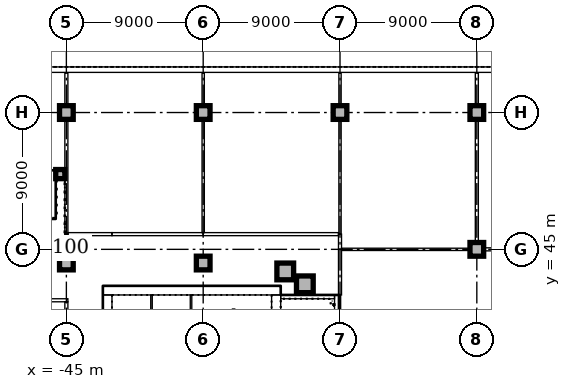
"""IFC4 building model, lengths in metres.
Left out: names, types, materials, properties, quantities, classifications, styles, units other than length and angle.
Written with IfcOpenShell. Run it as: python <this file> out.ifc"""

import sys

from ifc_helpers import new_model, si_unit, direction, frame, frame_2d, origin, origin_2d, place, context, subcontext, project, spatial, rectangle, extrude, element, fill, save


model = new_model("IFC4")
c1 = context("Model", 3, precision=1e-05, world=origin(), true_north=direction((0.0, 1.0)))
c2 = subcontext(c1, "Body", "Model", "MODEL_VIEW")
j1 = project(units=[si_unit("LENGTHUNIT", "METRE"), si_unit("PLANEANGLEUNIT", "RADIAN")], contexts=[c1])
p1 = place(None, origin())
s1 = spatial("IfcSite", under=j1, at=p1, CompositionType="ELEMENT")
p2 = place(p1, origin())
s2 = spatial("IfcBuilding", under=s1, at=p2, CompositionType="ELEMENT")
p3 = place(p2, origin())
s3 = spatial("IfcBuildingStorey", under=s2, at=p3, CompositionType="ELEMENT", Elevation=0.0)
p4 = place(p3, frame((-30.9, 42.3, 0.0), z_axis=(0.0, 0.0, 1.0), x_axis=(-1.0, 0.0, 0.0)))
e1 = element("IfcWall", 1, at=p4, inside=s3, PredefinedType="SOLIDWALL", context=c2, shape_type="SweptSolid", body=[
    extrude(rectangle(XDim=11.7, YDim=0.6, at=frame_2d((5.85, 0.0))), origin(), (0.0, 0.0, 1.0), 6.0),
])
p5 = place(p3, frame((-31.2, 30.5, 0.0), z_axis=(0.0, 0.0, 1.0), x_axis=(0.0, 1.0, 0.0)))
e2 = element("IfcWall", 2, at=p5, inside=s3, PredefinedType="SOLIDWALL", context=c2, shape_type="SweptSolid", body=[
    extrude(rectangle(XDim=11.5, YDim=0.6, at=frame_2d((5.75, 0.0))), origin(), (0.0, 0.0, 1.0), 6.0),
])
p6 = place(p5, frame((0.85, 0.0, 0.0)))
e3 = element("IfcOpeningElement", 3, at=p6, cuts=e2, PredefinedType="OPENING", context=c2, shape_type="SweptSolid", body=[
    extrude(rectangle(XDim=1.8, YDim=2.1, at=frame_2d((0.9, 1.05))), frame((0.0, 0.31, 0.0), z_axis=(0.0, -1.0, 0.0), x_axis=(1.0, 0.0, 0.0)), (0.0, 0.0, 1.0), 0.62),
])
p7 = place(p3, frame((-42.3, 42.0, 0.0), z_axis=(0.0, 0.0, 1.0), x_axis=(0.0, -1.0, 0.0)))
e4 = element("IfcWall", 4, at=p7, inside=s3, PredefinedType="SOLIDWALL", context=c2, shape_type="SweptSolid", body=[
    extrude(rectangle(XDim=11.5, YDim=0.6, at=frame_2d((5.75, 0.0))), origin(), (0.0, 0.0, 1.0), 6.0),
])
p8 = place(p7, frame((8.85, 0.0, 0.0)))
e5 = element("IfcOpeningElement", 5, at=p8, cuts=e4, PredefinedType="OPENING", context=c2, shape_type="SweptSolid", body=[
    extrude(rectangle(XDim=1.8, YDim=2.1, at=frame_2d((0.9, 1.05))), frame((0.0, 0.31, 0.0), z_axis=(0.0, -1.0, 0.0), x_axis=(1.0, 0.0, 0.0)), (0.0, 0.0, 1.0), 0.62),
])
p9 = place(p3, frame((-27.36, 41.875, 0.0), z_axis=(0.0, 0.0, 1.0), x_axis=(-1.0, 0.0, 0.0)))
e6 = element("IfcWall", 6, at=p9, inside=s3, PredefinedType="SOLIDWALL", context=c2, shape_type="SweptSolid", body=[
    extrude(rectangle(XDim=3.54, YDim=0.25, at=frame_2d((1.77, 0.0))), origin(), (0.0, 0.0, 1.0), 6.0),
])
p10 = place(p3, frame((-27.235, 35.35, 0.0), z_axis=(0.0, 0.0, 1.0), x_axis=(0.0, 1.0, 0.0)))
e7 = element("IfcWall", 7, at=p10, inside=s3, PredefinedType="SOLIDWALL", context=c2, shape_type="SweptSolid", body=[
    extrude(rectangle(XDim=6.65, YDim=0.25, at=frame_2d((3.325, 0.0))), origin(), (0.0, 0.0, 1.0), 6.0),
])
for number, where, z_axis, x_axis in (
    (8, (-29.313, 42.7, 0.0), (0.0, 0.0, 1.0), (1.0, 0.0, 0.0)),
    (9, (-30.602, 43.547, 0.0), (0.0, 0.0, 1.0), (1.0, 0.0, 0.0)),
):
    element("IfcColumn", number, at=place(p3, frame(where, z_axis=z_axis, x_axis=x_axis)), inside=s3, PredefinedType="COLUMN", context=c2, shape_type="SweptSolid", body=[
        extrude(rectangle(XDim=1.1, YDim=1.1, at=origin_2d()), origin(), (0.0, 0.0, 1.0), 5.7),
    ])
for number, where, z_axis, x_axis in (
    (10, (-45.0, 44.1, 0.0), (0.0, 0.0, 1.0), (1.0, 0.0, 0.0)),
    (11, (-36.0, 44.1, 0.0), (0.0, 0.0, 1.0), (1.0, 0.0, 0.0)),
    (12, (-45.0, 54.0, 0.0), (0.0, 0.0, 1.0), (1.0, 0.0, 0.0)),
    (13, (-36.0, 54.0, 0.0), (0.0, 0.0, 1.0), (1.0, 0.0, 0.0)),
    (14, (-27.0, 54.0, 0.0), (0.0, 0.0, 1.0), (1.0, 0.0, 0.0)),
    (15, (-18.0, 45.0, 0.0), (0.0, 0.0, 1.0), (1.0, 0.0, 0.0)),
    (16, (-18.0, 54.0, 0.0), (0.0, 0.0, 1.0), (1.0, 0.0, 0.0)),
):
    element("IfcColumn", number, at=place(p3, frame(where, z_axis=z_axis, x_axis=x_axis)), inside=s3, PredefinedType="COLUMN", context=c2, shape_type="SweptSolid", body=[
        extrude(rectangle(XDim=0.9, YDim=0.9, at=origin_2d()), origin(), (0.0, 0.0, 1.0), 5.7),
    ])
p11 = place(p3, frame((3.4, 56.82, 0.0), z_axis=(0.0, 0.0, 1.0), x_axis=(-1.0, 0.0, 0.0)))
e17 = element("IfcWall", 17, at=p11, inside=s3, PredefinedType="STANDARD", context=c2, shape_type="SweptSolid", body=[
    extrude(rectangle(XDim=84.4, YDim=0.36, at=frame_2d((42.2, 0.0))), origin(), (0.0, 0.0, 1.0), 5.7),
])
p12 = place(p11, frame((15.7, 0.0, 0.0)))
e18 = element("IfcOpeningElement", 18, at=p12, cuts=e17, PredefinedType="OPENING", context=c2, shape_type="SweptSolid", body=[
    extrude(rectangle(XDim=2.4, YDim=2.4, at=frame_2d((1.2, 1.2))), frame((0.0, 0.19, 0.0), z_axis=(0.0, -1.0, 0.0), x_axis=(1.0, 0.0, 0.0)), (0.0, 0.0, 1.0), 0.38),
])
p13 = place(p11, frame((76.6, 0.0, 0.0)))
e19 = element("IfcOpeningElement", 19, at=p13, cuts=e17, PredefinedType="OPENING", context=c2, shape_type="SweptSolid", body=[
    extrude(rectangle(XDim=6.6, YDim=4.2, at=frame_2d((3.3, 2.1))), frame((0.0, 0.19, 0.0), z_axis=(0.0, -1.0, 0.0), x_axis=(1.0, 0.0, 0.0)), (0.0, 0.0, 1.0), 0.38),
])
p14 = place(p11, frame((59.65, 0.0, 0.0)))
e20 = element("IfcOpeningElement", 20, at=p14, cuts=e17, PredefinedType="OPENING", context=c2, shape_type="SweptSolid", body=[
    extrude(rectangle(XDim=4.5, YDim=4.2, at=frame_2d((2.25, 2.1))), frame((0.0, 0.19, 0.0), z_axis=(0.0, -1.0, 0.0), x_axis=(1.0, 0.0, 0.0)), (0.0, 0.0, 1.0), 0.38),
])
p15 = place(p11, frame((58.3, 0.0, 0.0)))
e21 = element("IfcOpeningElement", 21, at=p15, cuts=e17, PredefinedType="OPENING", context=c2, shape_type="SweptSolid", body=[
    extrude(rectangle(XDim=1.2, YDim=2.2, at=frame_2d((0.6, 1.1))), frame((0.0, 0.19, 0.0), z_axis=(0.0, -1.0, 0.0), x_axis=(1.0, 0.0, 0.0)), (0.0, 0.0, 1.0), 0.38),
])
p16 = place(p11, frame((70.0, 0.0, 0.0)))
e22 = element("IfcOpeningElement", 22, at=p16, cuts=e17, PredefinedType="OPENING", context=c2, shape_type="SweptSolid", body=[
    extrude(rectangle(XDim=1.8, YDim=2.2, at=frame_2d((0.9, 1.1))), frame((0.0, 0.19, 0.0), z_axis=(0.0, -1.0, 0.0), x_axis=(1.0, 0.0, 0.0)), (0.0, 0.0, 1.0), 0.38),
])
p17 = place(p11, frame((52.0, 0.0, 0.0)))
e23 = element("IfcOpeningElement", 23, at=p17, cuts=e17, PredefinedType="OPENING", context=c2, shape_type="SweptSolid", body=[
    extrude(rectangle(XDim=1.8, YDim=2.2, at=frame_2d((0.9, 1.1))), frame((0.0, 0.19, 0.0), z_axis=(0.0, -1.0, 0.0), x_axis=(1.0, 0.0, 0.0)), (0.0, 0.0, 1.0), 0.38),
])
p18 = place(p11, frame((1.75, 0.0, 0.6)))
e24 = element("IfcOpeningElement", 24, at=p18, cuts=e17, PredefinedType="OPENING", context=c2, shape_type="SweptSolid", body=[
    extrude(rectangle(XDim=3.3, YDim=3.0, at=frame_2d((1.65, 1.5))), frame((0.0, 0.19, 0.0), z_axis=(0.0, -1.0, 0.0), x_axis=(1.0, 0.0, 0.0)), (0.0, 0.0, 1.0), 0.38),
])
p19 = place(p11, frame((6.25, 0.0, 0.6)))
e25 = element("IfcOpeningElement", 25, at=p19, cuts=e17, PredefinedType="OPENING", context=c2, shape_type="SweptSolid", body=[
    extrude(rectangle(XDim=3.3, YDim=3.0, at=frame_2d((1.65, 1.5))), frame((0.0, 0.19, 0.0), z_axis=(0.0, -1.0, 0.0), x_axis=(1.0, 0.0, 0.0)), (0.0, 0.0, 1.0), 0.38),
])
p20 = place(p11, frame((10.75, 0.0, 0.6)))
e26 = element("IfcOpeningElement", 26, at=p20, cuts=e17, PredefinedType="OPENING", context=c2, shape_type="SweptSolid", body=[
    extrude(rectangle(XDim=3.3, YDim=3.0, at=frame_2d((1.65, 1.5))), frame((0.0, 0.19, 0.0), z_axis=(0.0, -1.0, 0.0), x_axis=(1.0, 0.0, 0.0)), (0.0, 0.0, 1.0), 0.38),
])
p21 = place(p11, frame((19.75, 0.0, 0.6)))
e27 = element("IfcOpeningElement", 27, at=p21, cuts=e17, PredefinedType="OPENING", context=c2, shape_type="SweptSolid", body=[
    extrude(rectangle(XDim=3.3, YDim=3.0, at=frame_2d((1.65, 1.5))), frame((0.0, 0.19, 0.0), z_axis=(0.0, -1.0, 0.0), x_axis=(1.0, 0.0, 0.0)), (0.0, 0.0, 1.0), 0.38),
])
p22 = place(p11, frame((24.25, 0.0, 0.6)))
e28 = element("IfcOpeningElement", 28, at=p22, cuts=e17, PredefinedType="OPENING", context=c2, shape_type="SweptSolid", body=[
    extrude(rectangle(XDim=3.3, YDim=3.0, at=frame_2d((1.65, 1.5))), frame((0.0, 0.19, 0.0), z_axis=(0.0, -1.0, 0.0), x_axis=(1.0, 0.0, 0.0)), (0.0, 0.0, 1.0), 0.38),
])
p23 = place(p11, frame((28.75, 0.0, 0.6)))
e29 = element("IfcOpeningElement", 29, at=p23, cuts=e17, PredefinedType="OPENING", context=c2, shape_type="SweptSolid", body=[
    extrude(rectangle(XDim=3.3, YDim=3.0, at=frame_2d((1.65, 1.5))), frame((0.0, 0.19, 0.0), z_axis=(0.0, -1.0, 0.0), x_axis=(1.0, 0.0, 0.0)), (0.0, 0.0, 1.0), 0.38),
])
p24 = place(p11, frame((33.25, 0.0, 0.6)))
e30 = element("IfcOpeningElement", 30, at=p24, cuts=e17, PredefinedType="OPENING", context=c2, shape_type="SweptSolid", body=[
    extrude(rectangle(XDim=3.3, YDim=3.0, at=frame_2d((1.65, 1.5))), frame((0.0, 0.19, 0.0), z_axis=(0.0, -1.0, 0.0), x_axis=(1.0, 0.0, 0.0)), (0.0, 0.0, 1.0), 0.38),
])
p25 = place(p11, frame((37.75, 0.0, 0.6)))
e31 = element("IfcOpeningElement", 31, at=p25, cuts=e17, PredefinedType="OPENING", context=c2, shape_type="SweptSolid", body=[
    extrude(rectangle(XDim=3.3, YDim=3.0, at=frame_2d((1.65, 1.5))), frame((0.0, 0.19, 0.0), z_axis=(0.0, -1.0, 0.0), x_axis=(1.0, 0.0, 0.0)), (0.0, 0.0, 1.0), 0.38),
])
p26 = place(p11, frame((42.25, 0.0, 0.6)))
e32 = element("IfcOpeningElement", 32, at=p26, cuts=e17, PredefinedType="OPENING", context=c2, shape_type="SweptSolid", body=[
    extrude(rectangle(XDim=3.3, YDim=3.0, at=frame_2d((1.65, 1.5))), frame((0.0, 0.19, 0.0), z_axis=(0.0, -1.0, 0.0), x_axis=(1.0, 0.0, 0.0)), (0.0, 0.0, 1.0), 0.38),
])
p27 = place(p11, frame((46.75, 0.0, 0.6)))
e33 = element("IfcOpeningElement", 33, at=p27, cuts=e17, PredefinedType="OPENING", context=c2, shape_type="SweptSolid", body=[
    extrude(rectangle(XDim=3.3, YDim=3.0, at=frame_2d((1.65, 1.5))), frame((0.0, 0.19, 0.0), z_axis=(0.0, -1.0, 0.0), x_axis=(1.0, 0.0, 0.0)), (0.0, 0.0, 1.0), 0.38),
])
for number, where, z_axis, x_axis in (
    (34, (-45.4, 49.95, 0.0), (0.0, 0.0, 1.0), (1.0, 0.0, 0.0)),
    (35, (-45.4, 45.4, 0.0), (0.0, 0.0, 1.0), (1.0, 0.0, 0.0)),
):
    element("IfcColumn", number, at=place(p3, frame(where, z_axis=z_axis, x_axis=x_axis)), inside=s3, PredefinedType="COLUMN", context=c2, shape_type="SweptSolid", body=[
        extrude(rectangle(XDim=0.6, YDim=0.6, at=origin_2d()), origin(), (0.0, 0.0, 1.0), 6.0),
    ])
p28 = place(p3, frame((-45.0, 45.1, 0.0), z_axis=(0.0, 0.0, 1.0), x_axis=(0.0, 1.0, 0.0)))
e36 = element("IfcWall", 36, at=p28, inside=s3, PredefinedType="SOLIDWALL", context=c2, shape_type="SweptSolid", body=[
    extrude(rectangle(XDim=0.9, YDim=0.2, at=frame_2d((0.45, 0.0))), origin(), (0.0, 0.0, 1.0), 5.7),
])
p29 = place(p3, frame((-54.0, 45.0, 0.0), z_axis=(0.0, 0.0, 1.0), x_axis=(1.0, 0.0, 0.0)))
e37 = element("IfcWall", 37, at=p29, inside=s3, PredefinedType="SOLIDWALL", context=c2, shape_type="SweptSolid", body=[
    extrude(rectangle(XDim=9.1, YDim=0.2, at=frame_2d((4.55, 0.0))), origin(), (0.0, 0.0, 1.0), 5.7),
])
p30 = place(p3, frame((-45.0, 46.0, 0.0), z_axis=(0.0, 0.0, 1.0), x_axis=(0.0, 1.0, 0.0)))
e38 = element("IfcWall", 38, at=p30, inside=s3, PredefinedType="SOLIDWALL", context=c2, shape_type="SweptSolid", body=[
    extrude(rectangle(XDim=7.53, YDim=0.2, at=frame_2d((3.765, 0.0))), origin(), (0.0, 0.0, 1.0), 5.7),
])
p31 = place(p3, frame((-45.0, 54.47, 0.0), z_axis=(0.0, 0.0, 1.0), x_axis=(0.0, 1.0, 0.0)))
e39 = element("IfcWall", 39, at=p31, inside=s3, PredefinedType="SOLIDWALL", context=c2, shape_type="SweptSolid", body=[
    extrude(rectangle(XDim=2.13, YDim=0.2, at=frame_2d((1.065, 0.0))), origin(), (0.0, 0.0, 1.0), 5.7),
])
p32 = place(p3, frame((-26.9, 45.0, 0.0), z_axis=(0.0, 0.0, 1.0), x_axis=(1.0, 0.0, 0.0)))
e40 = element("IfcWall", 40, at=p32, inside=s3, PredefinedType="PARTITIONING", context=c2, shape_type="SweptSolid", body=[
    extrude(rectangle(XDim=8.43, YDim=0.15, at=frame_2d((4.215, 0.0))), origin(), (0.0, 0.0, 1.0), 5.7),
])
p33 = place(p3, frame((-18.0, 45.47, 0.0), z_axis=(0.0, 0.0, 1.0), x_axis=(0.0, 1.0, 0.0)))
e41 = element("IfcWall", 41, at=p33, inside=s3, PredefinedType="PARTITIONING", context=c2, shape_type="SweptSolid", body=[
    extrude(rectangle(XDim=8.06, YDim=0.2, at=frame_2d((4.03, 0.0))), origin(), (0.0, 0.0, 1.0), 5.7),
])
p34 = place(p33, frame((5.03, 0.0, 0.0)))
e42 = element("IfcOpeningElement", 42, at=p34, cuts=e41, PredefinedType="OPENING", context=c2, shape_type="SweptSolid", body=[
    extrude(rectangle(XDim=1.0, YDim=2.1, at=frame_2d((0.5, 1.05))), frame((0.0, 0.11, 0.0), z_axis=(0.0, -1.0, 0.0), x_axis=(1.0, 0.0, 0.0)), (0.0, 0.0, 1.0), 0.22),
])
p35 = place(p3, frame((-18.0, 54.47, 0.0), z_axis=(0.0, 0.0, 1.0), x_axis=(0.0, 1.0, 0.0)))
e43 = element("IfcWall", 43, at=p35, inside=s3, PredefinedType="PARTITIONING", context=c2, shape_type="SweptSolid", body=[
    extrude(rectangle(XDim=2.13, YDim=0.2, at=frame_2d((1.065, 0.0))), origin(), (0.0, 0.0, 1.0), 5.7),
])
p36 = place(p3, frame((-27.0, 45.0, 0.0), z_axis=(0.0, 0.0, 1.0), x_axis=(0.0, 1.0, 0.0)))
e44 = element("IfcWall", 44, at=p36, inside=s3, PredefinedType="PARTITIONING", context=c2, shape_type="SweptSolid", body=[
    extrude(rectangle(XDim=1.0, YDim=0.2, at=frame_2d((0.5, 0.0))), origin(), (0.0, 0.0, 1.0), 5.7),
])
p37 = place(p3, frame((-27.0, 46.0, 0.0), z_axis=(0.0, 0.0, 1.0), x_axis=(0.0, 1.0, 0.0)))
e45 = element("IfcWall", 45, at=p37, inside=s3, PredefinedType="PARTITIONING", context=c2, shape_type="SweptSolid", body=[
    extrude(rectangle(XDim=7.53, YDim=0.15, at=frame_2d((3.765, 0.0))), origin(), (0.0, 0.0, 1.0), 5.7),
])
p38 = place(p3, frame((-27.0, 54.47, 0.0), z_axis=(0.0, 0.0, 1.0), x_axis=(0.0, 1.0, 0.0)))
e46 = element("IfcWall", 46, at=p38, inside=s3, PredefinedType="PARTITIONING", context=c2, shape_type="SweptSolid", body=[
    extrude(rectangle(XDim=2.13, YDim=0.15, at=frame_2d((1.065, 0.0))), origin(), (0.0, 0.0, 1.0), 5.7),
])
p39 = place(p3, frame((-17.53, 45.0, 0.0), z_axis=(0.0, 0.0, 1.0), x_axis=(1.0, 0.0, 0.0)))
e47 = element("IfcWall", 47, at=p39, inside=s3, PredefinedType="PARTITIONING", context=c2, shape_type="SweptSolid", body=[
    extrude(rectangle(XDim=4.13, YDim=0.2, at=frame_2d((2.065, 0.0))), origin(), (0.0, 0.0, 1.0), 5.7),
])
p40 = place(p3, frame((-27.0, 42.0, 0.0), z_axis=(0.0, 0.0, 1.0), x_axis=(0.0, 1.0, 0.0)))
e48 = element("IfcWall", 48, at=p40, inside=s3, PredefinedType="PARTITIONING", context=c2, shape_type="SweptSolid", body=[
    extrude(rectangle(XDim=3.0, YDim=0.2, at=frame_2d((1.5, 0.0))), origin(), (0.0, 0.0, 1.0), 5.7),
])
p41 = place(p3, frame((-45.0, 36.42, 0.0), z_axis=(0.0, 0.0, 1.0), x_axis=(0.0, 1.0, 0.0)))
e49 = element("IfcWall", 49, at=p41, inside=s3, PredefinedType="PARTITIONING", context=c2, shape_type="SweptSolid", body=[
    extrude(rectangle(XDim=5.13, YDim=0.2, at=frame_2d((2.565, 0.0))), origin(), (0.0, 0.0, 1.0), 5.7),
])
p42 = place(p3, frame((-52.5, 41.65, 0.0), z_axis=(0.0, 0.0, 1.0), x_axis=(1.0, 0.0, 0.0)))
e50 = element("IfcWall", 50, at=p42, inside=s3, PredefinedType="PARTITIONING", context=c2, shape_type="SweptSolid", body=[
    extrude(rectangle(XDim=7.6, YDim=0.2, at=frame_2d((3.8, 0.0))), origin(), (0.0, 0.0, 1.0), 5.7),
])
p43 = place(p3, frame((-44.9, 46.0, 0.0), z_axis=(0.0, 0.0, 1.0), x_axis=(1.0, 0.0, 0.0)))
e51 = element("IfcWall", 51, at=p43, inside=s3, PredefinedType="PARTITIONING", context=c2, shape_type="SweptSolid", body=[
    extrude(rectangle(XDim=2.9, YDim=0.2, at=frame_2d((1.45, 0.0))), origin(), (0.0, 0.0, 1.0), 5.7),
])
p44 = place(p3, frame((-42.0, 46.0, 0.0), z_axis=(0.0, 0.0, 1.0), x_axis=(1.0, 0.0, 0.0)))
e52 = element("IfcWall", 52, at=p44, inside=s3, PredefinedType="PARTITIONING", context=c2, shape_type="SweptSolid", body=[
    extrude(rectangle(XDim=6.0, YDim=0.2, at=frame_2d((3.0, 0.0))), origin(), (0.0, 0.0, 1.0), 5.7),
])
p45 = place(p44, frame((2.5, 0.0, 0.0)))
e53 = element("IfcOpeningElement", 53, at=p45, cuts=e52, PredefinedType="OPENING", context=c2, shape_type="SweptSolid", body=[
    extrude(rectangle(XDim=1.0, YDim=2.1, at=frame_2d((0.5, 1.05))), frame((0.0, 0.11, 0.0), z_axis=(0.0, -1.0, 0.0), x_axis=(1.0, 0.0, 0.0)), (0.0, 0.0, 1.0), 0.22),
])
p46 = place(p3, frame((-36.0, 46.0, 0.0), z_axis=(0.0, 0.0, 1.0), x_axis=(1.0, 0.0, 0.0)))
e54 = element("IfcWall", 54, at=p46, inside=s3, PredefinedType="PARTITIONING", context=c2, shape_type="SweptSolid", body=[
    extrude(rectangle(XDim=8.9, YDim=0.2, at=frame_2d((4.45, 0.0))), origin(), (0.0, 0.0, 1.0), 5.7),
])
p47 = place(p46, frame((4.0, 0.0, 0.0)))
e55 = element("IfcOpeningElement", 55, at=p47, cuts=e54, PredefinedType="OPENING", context=c2, shape_type="SweptSolid", body=[
    extrude(rectangle(XDim=1.0, YDim=2.1, at=frame_2d((0.5, 1.05))), frame((0.0, 0.11, 0.0), z_axis=(0.0, -1.0, 0.0), x_axis=(1.0, 0.0, 0.0)), (0.0, 0.0, 1.0), 0.22),
])
p48 = place(p3, frame((-36.0, 46.1, 0.0), z_axis=(0.0, 0.0, 1.0), x_axis=(0.0, 1.0, 0.0)))
e56 = element("IfcWall", 56, at=p48, inside=s3, PredefinedType="PARTITIONING", context=c2, shape_type="SweptSolid", body=[
    extrude(rectangle(XDim=7.43, YDim=0.15, at=frame_2d((3.715, 0.0))), origin(), (0.0, 0.0, 1.0), 5.7),
])
p49 = place(p3, frame((-36.0, 54.47, 0.0), z_axis=(0.0, 0.0, 1.0), x_axis=(0.0, 1.0, 0.0)))
e57 = element("IfcWall", 57, at=p49, inside=s3, PredefinedType="PARTITIONING", context=c2, shape_type="SweptSolid", body=[
    extrude(rectangle(XDim=2.13, YDim=0.15, at=frame_2d((1.065, 0.0))), origin(), (0.0, 0.0, 1.0), 5.7),
])
p50 = place(p3, frame((-34.0, 41.075, 0.0), z_axis=(0.0, 0.0, 1.0), x_axis=(0.0, -1.0, 0.0)))
e58 = element("IfcWall", 58, at=p50, inside=s3, PredefinedType="SOLIDWALL", context=c2, shape_type="SweptSolid", body=[
    extrude(rectangle(XDim=7.0, YDim=0.15, at=frame_2d((3.5, 0.0))), origin(), (0.0, 0.0, 1.0), 6.0),
])
for number, where, z_axis, x_axis in (
    (59, (-39.4, 34.075, 0.0), (0.0, 0.0, 1.0), (0.0, 1.0, 0.0)),
    (60, (-36.8, 34.075, 0.0), (0.0, 0.0, 1.0), (0.0, 1.0, 0.0)),
):
    element("IfcWall", number, at=place(p3, frame(where, z_axis=z_axis, x_axis=x_axis)), inside=s3, PredefinedType="PARTITIONING", context=c2, shape_type="SweptSolid", body=[
        extrude(rectangle(XDim=7.925, YDim=0.1, at=frame_2d((3.962, 0.0))), origin(), (0.0, 0.0, 1.0), 5.7),
    ])
p51 = place(p21, origin())
e61 = element("IfcWindow", 61, at=p51, inside=s3, PartitioningType="SINGLE_PANEL", PredefinedType="WINDOW", context=c2, shape_type="SweptSolid", body=[
    extrude(rectangle(XDim=3.3, YDim=3.0, at=frame_2d((1.65, 1.5))), frame((0.0, 0.13, 0.0), z_axis=(0.0, -1.0, 0.0), x_axis=(1.0, 0.0, 0.0)), (0.0, 0.0, 1.0), 0.06),
])
fill(e27, e61)
p52 = place(p22, origin())
e62 = element("IfcWindow", 62, at=p52, inside=s3, PartitioningType="SINGLE_PANEL", PredefinedType="WINDOW", context=c2, shape_type="SweptSolid", body=[
    extrude(rectangle(XDim=3.3, YDim=3.0, at=frame_2d((1.65, 1.5))), frame((0.0, 0.13, 0.0), z_axis=(0.0, -1.0, 0.0), x_axis=(1.0, 0.0, 0.0)), (0.0, 0.0, 1.0), 0.06),
])
fill(e28, e62)
p53 = place(p23, origin())
e63 = element("IfcWindow", 63, at=p53, inside=s3, PartitioningType="SINGLE_PANEL", PredefinedType="WINDOW", context=c2, shape_type="SweptSolid", body=[
    extrude(rectangle(XDim=3.3, YDim=3.0, at=frame_2d((1.65, 1.5))), frame((0.0, 0.13, 0.0), z_axis=(0.0, -1.0, 0.0), x_axis=(1.0, 0.0, 0.0)), (0.0, 0.0, 1.0), 0.06),
])
fill(e29, e63)
p54 = place(p24, origin())
e64 = element("IfcWindow", 64, at=p54, inside=s3, PartitioningType="SINGLE_PANEL", PredefinedType="WINDOW", context=c2, shape_type="SweptSolid", body=[
    extrude(rectangle(XDim=3.3, YDim=3.0, at=frame_2d((1.65, 1.5))), frame((0.0, 0.13, 0.0), z_axis=(0.0, -1.0, 0.0), x_axis=(1.0, 0.0, 0.0)), (0.0, 0.0, 1.0), 0.06),
])
fill(e30, e64)
p55 = place(p25, origin())
e65 = element("IfcWindow", 65, at=p55, inside=s3, PartitioningType="SINGLE_PANEL", PredefinedType="WINDOW", context=c2, shape_type="SweptSolid", body=[
    extrude(rectangle(XDim=3.3, YDim=3.0, at=frame_2d((1.65, 1.5))), frame((0.0, 0.13, 0.0), z_axis=(0.0, -1.0, 0.0), x_axis=(1.0, 0.0, 0.0)), (0.0, 0.0, 1.0), 0.06),
])
fill(e31, e65)
p56 = place(p26, origin())
e66 = element("IfcWindow", 66, at=p56, inside=s3, PartitioningType="SINGLE_PANEL", PredefinedType="WINDOW", context=c2, shape_type="SweptSolid", body=[
    extrude(rectangle(XDim=3.3, YDim=3.0, at=frame_2d((1.65, 1.5))), frame((0.0, 0.13, 0.0), z_axis=(0.0, -1.0, 0.0), x_axis=(1.0, 0.0, 0.0)), (0.0, 0.0, 1.0), 0.06),
])
fill(e32, e66)
p57 = place(p27, origin())
e67 = element("IfcWindow", 67, at=p57, inside=s3, PartitioningType="SINGLE_PANEL", PredefinedType="WINDOW", context=c2, shape_type="SweptSolid", body=[
    extrude(rectangle(XDim=3.3, YDim=3.0, at=frame_2d((1.65, 1.5))), frame((0.0, 0.13, 0.0), z_axis=(0.0, -1.0, 0.0), x_axis=(1.0, 0.0, 0.0)), (0.0, 0.0, 1.0), 0.06),
])
fill(e33, e67)
p58 = place(p34, origin())
e68 = element("IfcDoor", 68, at=p58, inside=s3, OperationType="SINGLE_SWING_RIGHT", PredefinedType="DOOR", context=c2, shape_type="SweptSolid", body=[
    extrude(rectangle(XDim=1.0, YDim=2.1, at=frame_2d((0.5, 1.05))), frame((0.0, 0.025, 0.0), z_axis=(0.0, -1.0, 0.0), x_axis=(1.0, 0.0, 0.0)), (0.0, 0.0, 1.0), 0.05),
])
fill(e42, e68)
p59 = place(p45, origin())
e69 = element("IfcDoor", 69, at=p59, inside=s3, OperationType="SINGLE_SWING_LEFT", PredefinedType="DOOR", context=c2, shape_type="SweptSolid", body=[
    extrude(rectangle(XDim=1.0, YDim=2.1, at=frame_2d((0.5, 1.05))), frame((0.0, 0.025, 0.0), z_axis=(0.0, -1.0, 0.0), x_axis=(1.0, 0.0, 0.0)), (0.0, 0.0, 1.0), 0.05),
])
fill(e53, e69)
p60 = place(p47, origin())
e70 = element("IfcDoor", 70, at=p60, inside=s3, OperationType="SINGLE_SWING_RIGHT", PredefinedType="DOOR", context=c2, shape_type="SweptSolid", body=[
    extrude(rectangle(XDim=1.0, YDim=2.1, at=frame_2d((0.5, 1.05))), frame((0.0, 0.025, 0.0), z_axis=(0.0, -1.0, 0.0), x_axis=(1.0, 0.0, 0.0)), (0.0, 0.0, 1.0), 0.05),
])
fill(e55, e70)
save(model, sys.argv[1])
